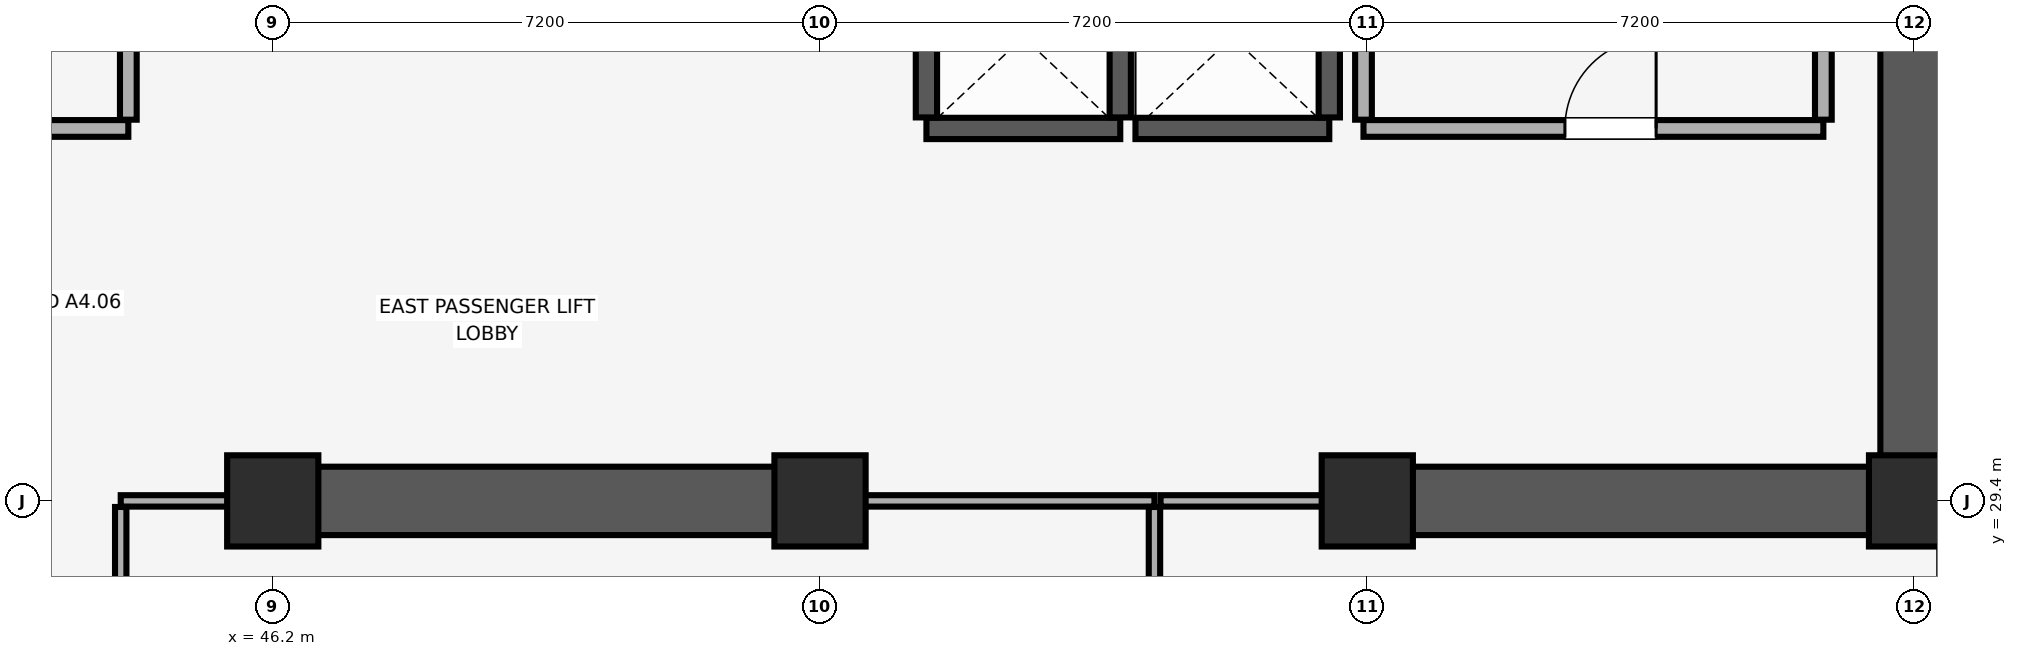
"""IFC4 building model, lengths in metres.
Left out: names, types, materials, properties, quantities, classifications, styles, units other than length and angle.
Written with IfcOpenShell. Run it as: python <this file> out.ifc"""

import sys

from ifc_helpers import new_model, si_unit, direction, frame, frame_2d, origin, origin_2d, place, context, subcontext, project, spatial, rectangle, extrude, element, fill, save


model = new_model("IFC4")
c1 = context("Model", 3, precision=1e-05, world=origin(), true_north=direction((0.0, 1.0)))
c2 = subcontext(c1, "Body", "Model", "MODEL_VIEW")
j1 = project(units=[si_unit("LENGTHUNIT", "METRE"), si_unit("PLANEANGLEUNIT", "RADIAN")], contexts=[c1])
p1 = place(None, origin())
s1 = spatial("IfcSite", under=j1, at=p1, CompositionType="ELEMENT")
p2 = place(p1, origin())
s2 = spatial("IfcBuilding", under=s1, at=p2, CompositionType="ELEMENT")
p3 = place(p2, frame((0.0, 0.0, 104.3)))
s3 = spatial("IfcBuildingStorey", under=s2, at=p3, CompositionType="ELEMENT", Elevation=104.3)
for number, where, z_axis, x_axis in (
    (1, (46.2, 29.4, 0.0), (0.0, 0.0, 1.0), (1.0, 0.0, 0.0)),
    (2, (53.4, 29.4, 0.0), (0.0, 0.0, 1.0), (1.0, 0.0, 0.0)),
    (3, (60.6, 29.4, 0.0), (0.0, 0.0, 1.0), (1.0, 0.0, 0.0)),
    (4, (67.8, 29.4, 0.0), (0.0, 0.0, 1.0), (1.0, 0.0, 0.0)),
):
    element("IfcColumn", number, at=place(p3, frame(where, z_axis=z_axis, x_axis=x_axis)), inside=s3, PredefinedType="COLUMN", context=c2, shape_type="SweptSolid", body=[
        extrude(rectangle(XDim=1.2, YDim=1.2, at=origin_2d()), origin(), (0.0, 0.0, 1.0), 3.51),
    ])
p4 = place(p3, frame((67.8, 29.4, 0.0), z_axis=(0.0, 0.0, 1.0), x_axis=(0.0, 1.0, 0.0)))
e5 = element("IfcWall", 5, at=p4, inside=s3, PredefinedType="SHEAR", context=c2, shape_type="SweptSolid", body=[
    extrude(rectangle(XDim=19.2, YDim=0.9, at=frame_2d((9.6, 0.0))), origin(), (0.0, 0.0, 1.0), 3.51),
])
p5 = place(p3, frame((46.0, 29.4, 0.0), z_axis=(0.0, 0.0, 1.0), x_axis=(1.0, 0.0, 0.0)))
e6 = element("IfcWall", 6, at=p5, inside=s3, PredefinedType="SHEAR", context=c2, shape_type="SweptSolid", body=[
    extrude(rectangle(XDim=7.6, YDim=0.9, at=frame_2d((3.8, 0.0))), origin(), (0.0, 0.0, 1.0), 3.51),
])
p6 = place(p3, frame((60.4, 29.4, 0.0), z_axis=(0.0, 0.0, 1.0), x_axis=(1.0, 0.0, 0.0)))
e7 = element("IfcWall", 7, at=p6, inside=s3, PredefinedType="SHEAR", context=c2, shape_type="SweptSolid", body=[
    extrude(rectangle(XDim=6.945, YDim=0.9, at=frame_2d((3.473, 0.0))), origin(), (0.0, 0.0, 1.0), 3.51),
])
p7 = place(p3, frame((54.8, 34.3, 0.0), z_axis=(0.0, 0.0, 1.0), x_axis=(1.0, 0.0, 0.0)))
e8 = element("IfcWall", 8, at=p7, inside=s3, PredefinedType="SHEAR", context=c2, shape_type="SweptSolid", body=[
    extrude(rectangle(XDim=2.55, YDim=0.28, at=frame_2d((1.275, 0.0))), origin(), (0.0, 0.0, 1.0), 3.51),
])
for number, where, z_axis, x_axis in (
    (9, (54.8, 34.445, 0.0), (0.0, 0.0, 1.0), (0.0, 1.0, 0.0)),
    (10, (57.35, 34.445, 0.0), (0.0, 0.0, 1.0), (0.0, 1.0, 0.0)),
):
    element("IfcWall", number, at=place(p3, frame(where, z_axis=z_axis, x_axis=x_axis)), inside=s3, PredefinedType="SHEAR", context=c2, shape_type="SweptSolid", body=[
        extrude(rectangle(XDim=2.11, YDim=0.28, at=frame_2d((1.055, 0.0))), origin(), (0.0, 0.0, 1.0), 3.51),
    ])
p8 = place(p3, frame((57.55, 34.3, 0.0), z_axis=(0.0, 0.0, 1.0), x_axis=(1.0, 0.0, 0.0)))
e11 = element("IfcWall", 11, at=p8, inside=s3, PredefinedType="SHEAR", context=c2, shape_type="SweptSolid", body=[
    extrude(rectangle(XDim=2.55, YDim=0.28, at=frame_2d((1.275, 0.0))), origin(), (0.0, 0.0, 1.0), 3.51),
])
p9 = place(p3, frame((60.1, 34.445, 0.0), z_axis=(0.0, 0.0, 1.0), x_axis=(0.0, 1.0, 0.0)))
e12 = element("IfcWall", 12, at=p9, inside=s3, PredefinedType="SHEAR", context=c2, shape_type="SweptSolid", body=[
    extrude(rectangle(XDim=2.11, YDim=0.28, at=frame_2d((1.055, 0.0))), origin(), (0.0, 0.0, 1.0), 3.51),
])
p10 = place(p3, frame((60.55, 34.3, 0.0), z_axis=(0.0, 0.0, 1.0), x_axis=(1.0, 0.0, 0.0)))
e13 = element("IfcWall", 13, at=p10, inside=s3, PredefinedType="PARTITIONING", context=c2, shape_type="SweptSolid", body=[
    extrude(rectangle(XDim=6.05, YDim=0.22, at=frame_2d((3.025, 0.0))), origin(), (0.0, 0.0, 1.0), 3.51),
])
p11 = place(p10, frame((2.65, 0.0, 0.0)))
e14 = element("IfcOpeningElement", 14, at=p11, cuts=e13, PredefinedType="OPENING", context=c2, shape_type="SweptSolid", body=[
    extrude(rectangle(XDim=1.2, YDim=2.15, at=frame_2d((0.6, 1.075))), frame((0.0, 0.12, 0.0), z_axis=(0.0, -1.0, 0.0), x_axis=(1.0, 0.0, 0.0)), (0.0, 0.0, 1.0), 0.24),
])
p12 = place(p3, frame((60.55, 34.415, 0.0), z_axis=(0.0, 0.0, 1.0), x_axis=(0.0, 1.0, 0.0)))
e15 = element("IfcWall", 15, at=p12, inside=s3, PredefinedType="PARTITIONING", context=c2, shape_type="SweptSolid", body=[
    extrude(rectangle(XDim=5.64, YDim=0.22, at=frame_2d((2.82, 0.0))), origin(), (0.0, 0.0, 1.0), 3.51),
])
p13 = place(p3, frame((66.6, 34.415, 0.0), z_axis=(0.0, 0.0, 1.0), x_axis=(0.0, 1.0, 0.0)))
e16 = element("IfcWall", 16, at=p13, inside=s3, PredefinedType="PARTITIONING", context=c2, shape_type="SweptSolid", body=[
    extrude(rectangle(XDim=5.43, YDim=0.22, at=frame_2d((2.715, 0.0))), origin(), (0.0, 0.0, 1.0), 3.51),
])
p14 = place(p3, frame((39.7, 34.3, 0.0), z_axis=(0.0, 0.0, 1.0), x_axis=(1.0, 0.0, 0.0)))
e17 = element("IfcWall", 17, at=p14, inside=s3, PredefinedType="PARTITIONING", context=c2, shape_type="SweptSolid", body=[
    extrude(rectangle(XDim=4.6, YDim=0.22, at=frame_2d((2.3, 0.0))), origin(), (0.0, 0.0, 1.0), 3.51),
])
p15 = place(p14, frame((1.7, 0.0, 0.0)))
e18 = element("IfcOpeningElement", 18, at=p15, cuts=e17, PredefinedType="OPENING", context=c2, shape_type="SweptSolid", body=[
    extrude(rectangle(XDim=1.2, YDim=2.15, at=frame_2d((0.6, 1.075))), frame((0.0, 0.12, 0.0), z_axis=(0.0, -1.0, 0.0), x_axis=(1.0, 0.0, 0.0)), (0.0, 0.0, 1.0), 0.24),
])
p16 = place(p3, frame((44.3, 34.415, 0.0), z_axis=(0.0, 0.0, 1.0), x_axis=(0.0, 1.0, 0.0)))
e19 = element("IfcWall", 19, at=p16, inside=s3, PredefinedType="PARTITIONING", context=c2, shape_type="SweptSolid", body=[
    extrude(rectangle(XDim=5.785, YDim=0.22, at=frame_2d((2.893, 0.0))), origin(), (0.0, 0.0, 1.0), 3.51),
])
p17 = place(p3, frame((44.2, 29.4, 0.0), z_axis=(0.0, 0.0, 1.0), x_axis=(1.0, 0.0, 0.0)))
e20 = element("IfcWall", 20, at=p17, inside=s3, PredefinedType="PARTITIONING", context=c2, shape_type="SweptSolid", body=[
    extrude(rectangle(XDim=1.79, YDim=0.15, at=frame_2d((0.895, 0.0))), origin(), (0.0, 0.0, 1.0), 2.41),
])
p18 = place(p3, frame((53.61, 29.4, 0.0), z_axis=(0.0, 0.0, 1.0), x_axis=(1.0, 0.0, 0.0)))
e21 = element("IfcWall", 21, at=p18, inside=s3, PredefinedType="PARTITIONING", context=c2, shape_type="SweptSolid", body=[
    extrude(rectangle(XDim=4.19, YDim=0.15, at=frame_2d((2.095, 0.0))), origin(), (0.0, 0.0, 1.0), 2.41),
])
for number, where, z_axis, x_axis in (
    (22, (44.2, 23.93, 0.0), (0.0, 0.0, 1.0), (0.0, 1.0, 0.0)),
    (23, (57.8, 23.93, 0.0), (0.0, 0.0, 1.0), (0.0, 1.0, 0.0)),
):
    element("IfcWall", number, at=place(p3, frame(where, z_axis=z_axis, x_axis=x_axis)), inside=s3, PredefinedType="PARTITIONING", context=c2, shape_type="SweptSolid", body=[
        extrude(rectangle(XDim=5.39, YDim=0.15, at=frame_2d((2.695, 0.0))), origin(), (0.0, 0.0, 1.0), 3.51),
    ])
p19 = place(p3, frame((57.88, 29.4, 0.0), z_axis=(0.0, 0.0, 1.0), x_axis=(1.0, 0.0, 0.0)))
e24 = element("IfcWall", 24, at=p19, inside=s3, PredefinedType="PARTITIONING", context=c2, shape_type="SweptSolid", body=[
    extrude(rectangle(XDim=2.51, YDim=0.15, at=frame_2d((1.255, 0.0))), origin(), (0.0, 0.0, 1.0), 2.41),
])
p20 = place(p11, origin())
e25 = element("IfcDoor", 25, at=p20, inside=s3, OperationType="SINGLE_SWING_RIGHT", PredefinedType="DOOR", context=c2, shape_type="SweptSolid", body=[
    extrude(rectangle(XDim=1.2, YDim=2.15, at=frame_2d((0.6, 1.075))), frame((0.0, 0.025, 0.0), z_axis=(0.0, -1.0, 0.0), x_axis=(1.0, 0.0, 0.0)), (0.0, 0.0, 1.0), 0.05),
])
fill(e14, e25)
save(model, sys.argv[1])
